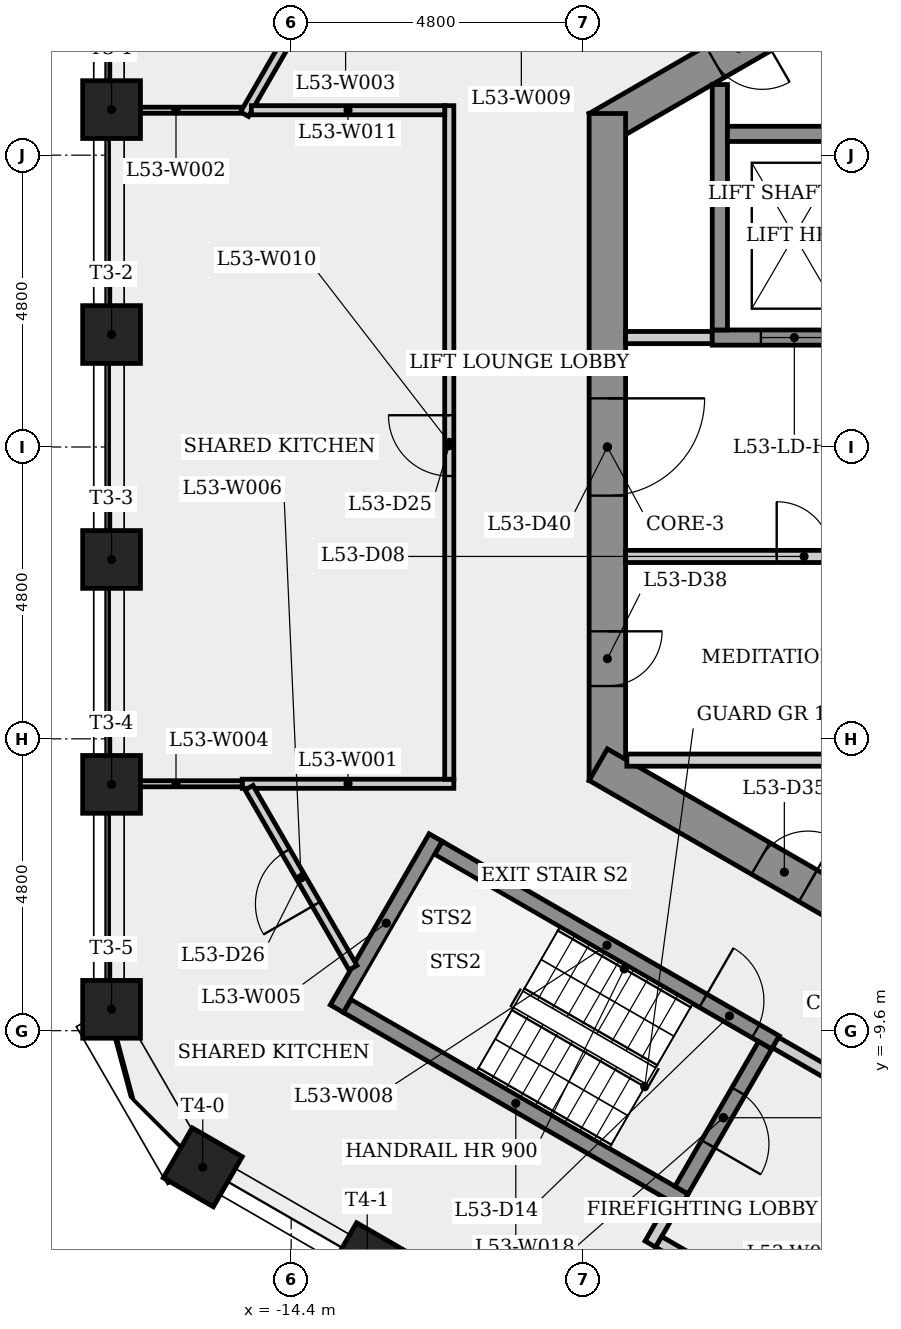
"""IFC4 building model, lengths in metres.
Left out: names, types, materials, properties, quantities, classifications, styles, units other than length and angle.
Written with IfcOpenShell. Run it as: python <this file> out.ifc"""

import sys

from ifc_helpers import new_model, si_unit, direction, frame, frame_2d, origin, origin_2d, place, context, subcontext, project, spatial, rectangle, extrude, element, fill, save


model = new_model("IFC4")
c1 = context("Model", 3, precision=1e-05, world=origin(), true_north=direction((0.0, 1.0)))
c2 = subcontext(c1, "Body", "Model", "MODEL_VIEW")
j1 = project(units=[si_unit("LENGTHUNIT", "METRE"), si_unit("PLANEANGLEUNIT", "RADIAN")], contexts=[c1])
p1 = place(None, origin())
s1 = spatial("IfcSite", under=j1, at=p1, CompositionType="ELEMENT")
p2 = place(p1, origin())
s2 = spatial("IfcBuilding", under=s1, at=p2, CompositionType="ELEMENT")
p3 = place(p2, frame((0.0, 0.0, 198.7)))
s3 = spatial("IfcBuildingStorey", under=s2, at=p3, CompositionType="ELEMENT", Elevation=198.7)
p4 = place(p3, frame((0.15, 10.71, 0.0), z_axis=(0.0, 0.0, 1.0), x_axis=(-0.866023993627, -0.500002442456, 0.0)))
e1 = element("IfcWall", 1, at=p4, inside=s3, PredefinedType="SHEAR", context=c2, shape_type="SweptSolid", body=[
    extrude(rectangle(XDim=10.97, YDim=0.6, at=frame_2d((5.485, 0.0))), origin(), (0.0, 0.0, 1.0), 3.4),
])
p5 = place(p4, frame((7.855, 0.0, 0.0)))
e2 = element("IfcOpeningElement", 2, at=p5, cuts=e1, PredefinedType="OPENING", context=c2, shape_type="SweptSolid", body=[
    extrude(rectangle(XDim=0.9, YDim=2.1, at=frame_2d((0.45, 1.05))), frame((0.0, 0.31, 0.0), z_axis=(0.0, -1.0, 0.0), x_axis=(1.0, 0.0, 0.0)), (0.0, 0.0, 1.0), 0.62),
])
p6 = place(p4, frame((1.398, 0.0, 0.0)))
e3 = element("IfcOpeningElement", 3, at=p6, cuts=e1, PredefinedType="OPENING", context=c2, shape_type="SweptSolid", body=[
    extrude(rectangle(XDim=0.9, YDim=2.1, at=frame_2d((0.45, 1.05))), frame((0.0, 0.31, 0.0), z_axis=(0.0, -1.0, 0.0), x_axis=(1.0, 0.0, 0.0)), (0.0, 0.0, 1.0), 0.62),
])
p7 = place(p3, frame((-9.2, 5.485, 0.0), z_axis=(0.0, 0.0, 1.0), x_axis=(0.0, -1.0, 0.0)))
e4 = element("IfcWall", 4, at=p7, inside=s3, PredefinedType="SHEAR", context=c2, shape_type="SweptSolid", body=[
    extrude(rectangle(XDim=10.97, YDim=0.6, at=frame_2d((5.485, 0.0))), origin(), (0.0, 0.0, 1.0), 3.4),
])
p8 = place(p7, frame((8.516, 0.0, 0.0)))
e5 = element("IfcOpeningElement", 5, at=p8, cuts=e4, PredefinedType="OPENING", context=c2, shape_type="SweptSolid", body=[
    extrude(rectangle(XDim=0.9, YDim=2.1, at=frame_2d((0.45, 1.05))), frame((0.0, 0.31, 0.0), z_axis=(0.0, -1.0, 0.0), x_axis=(1.0, 0.0, 0.0)), (0.0, 0.0, 1.0), 0.62),
])
p9 = place(p7, frame((4.685, 0.0, 0.0)))
e6 = element("IfcOpeningElement", 6, at=p9, cuts=e4, PredefinedType="OPENING", context=c2, shape_type="SweptSolid", body=[
    extrude(rectangle(XDim=1.6, YDim=2.1, at=frame_2d((0.8, 1.05))), frame((0.0, 0.31, 0.0), z_axis=(0.0, -1.0, 0.0), x_axis=(1.0, 0.0, 0.0)), (0.0, 0.0, 1.0), 0.62),
])
p10 = place(p3, frame((-9.35, -5.225, 0.0), z_axis=(0.0, 0.0, 1.0), x_axis=(0.866023993627, -0.500002442456, 0.0)))
e7 = element("IfcWall", 7, at=p10, inside=s3, PredefinedType="SHEAR", context=c2, shape_type="SweptSolid", body=[
    extrude(rectangle(XDim=10.97, YDim=0.6, at=frame_2d((5.485, 0.0))), origin(), (0.0, 0.0, 1.0), 3.4),
])
p11 = place(p10, frame((3.084, 0.0, 0.0)))
e8 = element("IfcOpeningElement", 8, at=p11, cuts=e7, PredefinedType="OPENING", context=c2, shape_type="SweptSolid", body=[
    extrude(rectangle(XDim=0.9, YDim=2.1, at=frame_2d((0.45, 1.05))), frame((0.0, 0.31, 0.0), z_axis=(0.0, -1.0, 0.0), x_axis=(1.0, 0.0, 0.0)), (0.0, 0.0, 1.0), 0.62),
])
p12 = place(p10, frame((8.21, 0.0, 0.0)))
e9 = element("IfcOpeningElement", 9, at=p12, cuts=e7, PredefinedType="OPENING", context=c2, shape_type="SweptSolid", body=[
    extrude(rectangle(XDim=0.9, YDim=2.1, at=frame_2d((0.45, 1.05))), frame((0.0, 0.31, 0.0), z_axis=(0.0, -1.0, 0.0), x_axis=(1.0, 0.0, 0.0)), (0.0, 0.0, 1.0), 0.62),
])
for number, where, z_axis, x_axis in (
    (10, (-17.354, 5.549, 0.0), (0.0, 0.0, 1.0), (-1.0, 0.0, 0.0)),
    (11, (-17.354, 1.85, 0.0), (0.0, 0.0, 1.0), (-1.0, 0.0, 0.0)),
    (12, (-17.354, -1.85, 0.0), (0.0, 0.0, 1.0), (-1.0, 0.0, 0.0)),
    (13, (-17.354, -5.549, 0.0), (0.0, 0.0, 1.0), (-1.0, 0.0, 0.0)),
    (14, (-17.354, -9.249, 0.0), (0.0, 0.0, 1.0), (-1.0, 0.0, 0.0)),
    (15, (-15.854, -11.847, 0.0), (0.0, 0.0, 1.0), (-0.5, -0.866, 0.0)),
    (16, (-13.15, -13.408, 0.0), (0.0, 0.0, 1.0), (-0.5, -0.866, 0.0)),
):
    element("IfcColumn", number, at=place(p3, frame(where, z_axis=z_axis, x_axis=x_axis)), inside=s3, PredefinedType="COLUMN", context=c2, shape_type="SweptSolid", body=[
        extrude(rectangle(XDim=0.95, YDim=0.95, at=origin_2d()), origin(), (0.0, 0.0, 1.0), 3.4),
    ])
p13 = place(p3, frame((-15.205, -5.539, 0.0), z_axis=(0.0, 0.0, 1.0), x_axis=(1.0, 0.0, 0.0)))
e17 = element("IfcWall", 17, at=p13, inside=s3, PredefinedType="PARTITIONING", context=c2, shape_type="SweptSolid", body=[
    extrude(rectangle(XDim=3.48, YDim=0.15, at=frame_2d((1.74, 0.0))), origin(), (0.0, 0.0, 1.0), 3.0),
])
p14 = place(p3, frame((-15.205, 5.539, 0.0), z_axis=(0.0, 0.0, 1.0), x_axis=(-1.0, 0.0, 0.0)))
e18 = element("IfcWall", 18, at=p14, inside=s3, PredefinedType="PARTITIONING", context=c2, shape_type="SweptSolid", body=[
    extrude(rectangle(XDim=2.179, YDim=0.1, at=frame_2d((1.089, 0.0))), origin(), (0.0, 0.0, 1.0), 3.0),
])
p15 = place(p3, frame((-15.167, 5.474, 0.0), z_axis=(0.0, 0.0, 1.0), x_axis=(0.500012717347, 0.866018061296, 0.0)))
e19 = element("IfcWall", 19, at=p15, inside=s3, PredefinedType="PARTITIONING", context=c2, shape_type="SweptSolid", body=[
    extrude(rectangle(XDim=6.65, YDim=0.15, at=frame_2d((3.325, 0.0))), origin(), (0.0, 0.0, 1.0), 3.0),
])
p16 = place(p15, frame((2.825, 0.0, 0.0)))
e20 = element("IfcOpeningElement", 20, at=p16, cuts=e19, PredefinedType="OPENING", context=c2, shape_type="SweptSolid", body=[
    extrude(rectangle(XDim=1.0, YDim=2.1, at=frame_2d((0.5, 1.05))), frame((0.0, 0.085, 0.0), z_axis=(0.0, -1.0, 0.0), x_axis=(1.0, 0.0, 0.0)), (0.0, 0.0, 1.0), 0.17),
])
p17 = place(p3, frame((-15.205, -5.539, 0.0), z_axis=(0.0, 0.0, 1.0), x_axis=(-1.0, 0.0, 0.0)))
e21 = element("IfcWall", 21, at=p17, inside=s3, PredefinedType="PARTITIONING", context=c2, shape_type="SweptSolid", body=[
    extrude(rectangle(XDim=2.179, YDim=0.1, at=frame_2d((1.089, 0.0))), origin(), (0.0, 0.0, 1.0), 3.0),
])
p18 = place(p3, frame((-13.648, -9.239, 0.0), z_axis=(0.0, 0.0, 1.0), x_axis=(0.500017246033, 0.866015446554, 0.0)))
e22 = element("IfcWall", 22, at=p18, inside=s3, PredefinedType="SHEAR", context=c2, shape_type="SweptSolid", body=[
    extrude(rectangle(XDim=3.25, YDim=0.25, at=frame_2d((1.625, 0.0))), origin(), (0.0, 0.0, 1.0), 3.0),
])
p19 = place(p3, frame((-13.383, -8.564, 0.0), z_axis=(0.0, 0.0, 1.0), x_axis=(-0.499980071345, 0.866036909293, 0.0)))
e23 = element("IfcWall", 23, at=p19, inside=s3, PredefinedType="PARTITIONING", context=c2, shape_type="SweptSolid", body=[
    extrude(rectangle(XDim=3.418, YDim=0.15, at=frame_2d((1.709, 0.0))), origin(), (0.0, 0.0, 1.0), 3.0),
])
p20 = place(p19, frame((1.209, 0.0, 0.0)))
e24 = element("IfcOpeningElement", 24, at=p20, cuts=e23, PredefinedType="OPENING", context=c2, shape_type="SweptSolid", body=[
    extrude(rectangle(XDim=1.0, YDim=2.1, at=frame_2d((0.5, 1.05))), frame((0.0, 0.085, 0.0), z_axis=(0.0, -1.0, 0.0), x_axis=(1.0, 0.0, 0.0)), (0.0, 0.0, 1.0), 0.17),
])
p21 = place(p3, frame((-11.977, -6.595, 0.0), z_axis=(0.0, 0.0, 1.0), x_axis=(0.866025499775, -0.499999833739, 0.0)))
e25 = element("IfcWall", 25, at=p21, inside=s3, PredefinedType="SHEAR", context=c2, shape_type="SweptSolid", body=[
    extrude(rectangle(XDim=6.4, YDim=0.25, at=frame_2d((3.2, 0.0))), origin(), (0.0, 0.0, 1.0), 3.0),
])
p22 = place(p21, frame((5.025, 0.0, 0.0)))
e26 = element("IfcOpeningElement", 26, at=p22, cuts=e25, PredefinedType="OPENING", context=c2, shape_type="SweptSolid", body=[
    extrude(rectangle(XDim=1.0, YDim=2.1, at=frame_2d((0.5, 1.05))), frame((0.0, 0.135, 0.0), z_axis=(0.0, -1.0, 0.0), x_axis=(1.0, 0.0, 0.0)), (0.0, 0.0, 1.0), 0.27),
])
p23 = place(p3, frame((-11.8, -5.464, 0.0), z_axis=(0.0, 0.0, 1.0), x_axis=(0.0, 1.0, 0.0)))
e27 = element("IfcWall", 27, at=p23, inside=s3, PredefinedType="PARTITIONING", context=c2, shape_type="SweptSolid", body=[
    extrude(rectangle(XDim=11.078, YDim=0.15, at=frame_2d((5.539, 0.0))), origin(), (0.0, 0.0, 1.0), 3.0),
])
p24 = place(p23, frame((4.986, 0.0, 0.0)))
e28 = element("IfcOpeningElement", 28, at=p24, cuts=e27, PredefinedType="OPENING", context=c2, shape_type="SweptSolid", body=[
    extrude(rectangle(XDim=1.0, YDim=2.1, at=frame_2d((0.5, 1.05))), frame((0.0, 0.085, 0.0), z_axis=(0.0, -1.0, 0.0), x_axis=(1.0, 0.0, 0.0)), (0.0, 0.0, 1.0), 0.17),
])
p25 = place(p3, frame((-11.875, 5.539, 0.0), z_axis=(0.0, 0.0, 1.0), x_axis=(-1.0, 0.0, 0.0)))
e29 = element("IfcWall", 29, at=p25, inside=s3, PredefinedType="PARTITIONING", context=c2, shape_type="SweptSolid", body=[
    extrude(rectangle(XDim=3.18, YDim=0.15, at=frame_2d((1.59, 0.0))), origin(), (0.0, 0.0, 1.0), 3.0),
])
p26 = place(p3, frame((-8.9, 1.8, 0.0), z_axis=(0.0, 0.0, 1.0), x_axis=(1.0, 0.0, 0.0)))
e30 = element("IfcWall", 30, at=p26, inside=s3, PredefinedType="PARTITIONING", context=c2, shape_type="SweptSolid", body=[
    extrude(rectangle(XDim=1.425, YDim=0.2, at=frame_2d((0.712, 0.0))), origin(), (0.0, 0.0, 1.0), 3.0),
])
p27 = place(p3, frame((-8.88, -5.15, 0.0), z_axis=(0.0, 0.0, 1.0), x_axis=(1.0, 0.0, 0.0)))
e31 = element("IfcWall", 31, at=p27, inside=s3, PredefinedType="PARTITIONING", context=c2, shape_type="SweptSolid", body=[
    extrude(rectangle(XDim=11.205, YDim=0.2, at=frame_2d((5.603, 0.0))), origin(), (0.0, 0.0, 1.0), 3.0),
])
p28 = place(p3, frame((-8.493, -13.11, 0.0), z_axis=(0.0, 0.0, 1.0), x_axis=(0.500067724834, 0.865986299303, 0.0)))
e32 = element("IfcWall", 32, at=p28, inside=s3, PredefinedType="PARTITIONING", context=c2, shape_type="SweptSolid", body=[
    extrude(rectangle(XDim=0.775, YDim=0.2, at=frame_2d((0.388, 0.0))), origin(), (0.0, 0.0, 1.0), 3.0),
])
p29 = place(p3, frame((-7.935, -12.393, 0.0), z_axis=(0.0, 0.0, 1.0), x_axis=(-0.866025499775, 0.499999833739, 0.0)))
e33 = element("IfcWall", 33, at=p29, inside=s3, PredefinedType="SHEAR", context=c2, shape_type="SweptSolid", body=[
    extrude(rectangle(XDim=6.4, YDim=0.25, at=frame_2d((3.2, 0.0))), origin(), (0.0, 0.0, 1.0), 3.0),
])
p30 = place(p3, frame((-7.836, -13.373, 0.0), z_axis=(0.0, 0.0, 1.0), x_axis=(-0.866232998003, 0.499640263761, 0.0)))
e34 = element("IfcWall", 34, at=p30, inside=s3, PredefinedType="PARTITIONING", context=c2, shape_type="SweptSolid", body=[
    extrude(rectangle(XDim=0.6, YDim=0.2, at=frame_2d((0.3, 0.0))), origin(), (0.0, 0.0, 1.0), 3.0),
])
p31 = place(p3, frame((-7.475, 1.8, 0.0), z_axis=(0.0, 0.0, 1.0), x_axis=(1.0, 0.0, 0.0)))
e35 = element("IfcWall", 35, at=p31, inside=s3, PredefinedType="SHEAR", context=c2, shape_type="SweptSolid", body=[
    extrude(rectangle(XDim=14.95, YDim=0.25, at=frame_2d((7.475, 0.0))), origin(), (0.0, 0.0, 1.0), 3.0),
])
p32 = place(p31, frame((0.8, 0.0, 0.0)))
e36 = element("IfcOpeningElement", 36, at=p32, cuts=e35, PredefinedType="OPENING", context=c2, shape_type="SweptSolid", body=[
    extrude(rectangle(XDim=1.1, YDim=2.1, at=frame_2d((0.55, 1.05))), frame((0.0, 0.135, 0.0), z_axis=(0.0, -1.0, 0.0), x_axis=(1.0, 0.0, 0.0)), (0.0, 0.0, 1.0), 0.27),
])
p33 = place(p31, frame((3.25, 0.0, 0.0)))
e37 = element("IfcOpeningElement", 37, at=p33, cuts=e35, PredefinedType="OPENING", context=c2, shape_type="SweptSolid", body=[
    extrude(rectangle(XDim=1.1, YDim=2.1, at=frame_2d((0.55, 1.05))), frame((0.0, 0.135, 0.0), z_axis=(0.0, -1.0, 0.0), x_axis=(1.0, 0.0, 0.0)), (0.0, 0.0, 1.0), 0.27),
])
p34 = place(p31, frame((5.7, 0.0, 0.0)))
e38 = element("IfcOpeningElement", 38, at=p34, cuts=e35, PredefinedType="OPENING", context=c2, shape_type="SweptSolid", body=[
    extrude(rectangle(XDim=1.1, YDim=2.1, at=frame_2d((0.55, 1.05))), frame((0.0, 0.135, 0.0), z_axis=(0.0, -1.0, 0.0), x_axis=(1.0, 0.0, 0.0)), (0.0, 0.0, 1.0), 0.27),
])
p35 = place(p31, frame((8.15, 0.0, 0.0)))
e39 = element("IfcOpeningElement", 39, at=p35, cuts=e35, PredefinedType="OPENING", context=c2, shape_type="SweptSolid", body=[
    extrude(rectangle(XDim=1.1, YDim=2.1, at=frame_2d((0.55, 1.05))), frame((0.0, 0.135, 0.0), z_axis=(0.0, -1.0, 0.0), x_axis=(1.0, 0.0, 0.0)), (0.0, 0.0, 1.0), 0.27),
])
p36 = place(p31, frame((10.6, 0.0, 0.0)))
e40 = element("IfcOpeningElement", 40, at=p36, cuts=e35, PredefinedType="OPENING", context=c2, shape_type="SweptSolid", body=[
    extrude(rectangle(XDim=1.1, YDim=2.1, at=frame_2d((0.55, 1.05))), frame((0.0, 0.135, 0.0), z_axis=(0.0, -1.0, 0.0), x_axis=(1.0, 0.0, 0.0)), (0.0, 0.0, 1.0), 0.27),
])
p37 = place(p31, frame((13.05, 0.0, 0.0)))
e41 = element("IfcOpeningElement", 41, at=p37, cuts=e35, PredefinedType="OPENING", context=c2, shape_type="SweptSolid", body=[
    extrude(rectangle(XDim=1.1, YDim=2.1, at=frame_2d((0.55, 1.05))), frame((0.0, 0.135, 0.0), z_axis=(0.0, -1.0, 0.0), x_axis=(1.0, 0.0, 0.0)), (0.0, 0.0, 1.0), 0.27),
])
p38 = place(p3, frame((-7.35, 1.925, 0.0), z_axis=(0.0, 0.0, 1.0), x_axis=(0.0, 1.0, 0.0)))
e42 = element("IfcWall", 42, at=p38, inside=s3, PredefinedType="SHEAR", context=c2, shape_type="SweptSolid", body=[
    extrude(rectangle(XDim=4.036, YDim=0.25, at=frame_2d((2.018, 0.0))), origin(), (0.0, 0.0, 1.0), 3.0),
])
p39 = place(p3, frame((-7.225, 5.15, 0.0), z_axis=(0.0, 0.0, 1.0), x_axis=(1.0, 0.0, 0.0)))
e43 = element("IfcWall", 43, at=p39, inside=s3, PredefinedType="SHEAR", context=c2, shape_type="SweptSolid", body=[
    extrude(rectangle(XDim=14.7, YDim=0.25, at=frame_2d((7.35, 0.0))), origin(), (0.0, 0.0, 1.0), 3.0),
])
p40 = place(p3, frame((-6.605, -9.841, 0.0), z_axis=(0.0, 0.0, 1.0), x_axis=(-0.499996545922, -0.866027397988, 0.0)))
e44 = element("IfcWall", 44, at=p40, inside=s3, PredefinedType="SHEAR", context=c2, shape_type="SweptSolid", body=[
    extrude(rectangle(XDim=2.75, YDim=0.25, at=frame_2d((1.375, 0.0))), origin(), (0.0, 0.0, 1.0), 3.0),
])
p41 = place(p40, frame((0.875, 0.0, 0.0)))
e45 = element("IfcOpeningElement", 45, at=p41, cuts=e44, PredefinedType="OPENING", context=c2, shape_type="SweptSolid", body=[
    extrude(rectangle(XDim=1.0, YDim=2.1, at=frame_2d((0.5, 1.05))), frame((0.0, 0.135, 0.0), z_axis=(0.0, -1.0, 0.0), x_axis=(1.0, 0.0, 0.0)), (0.0, 0.0, 1.0), 0.27),
])
p42 = place(p3, frame((-6.435, -9.795, 0.0), z_axis=(0.0, 0.0, 1.0), x_axis=(0.866012907634, -0.500021643343, 0.0)))
e46 = element("IfcWall", 46, at=p42, inside=s3, PredefinedType="PARTITIONING", context=c2, shape_type="SweptSolid", body=[
    extrude(rectangle(XDim=4.45, YDim=0.2, at=frame_2d((2.225, 0.0))), origin(), (0.0, 0.0, 1.0), 3.0),
])
p43 = place(p42, frame((1.675, 0.0, 0.0)))
e47 = element("IfcOpeningElement", 47, at=p43, cuts=e46, PredefinedType="OPENING", context=c2, shape_type="SweptSolid", body=[
    extrude(rectangle(XDim=1.1, YDim=2.1, at=frame_2d((0.55, 1.05))), frame((0.0, 0.11, 0.0), z_axis=(0.0, -1.0, 0.0), x_axis=(1.0, 0.0, 0.0)), (0.0, 0.0, 1.0), 0.22),
])
p44 = place(p3, frame((-8.9, -1.8, 0.0), z_axis=(0.0, 0.0, 1.0), x_axis=(1.0, 0.0, 0.0)))
e48 = element("IfcWall", 48, at=p44, inside=s3, PredefinedType="PARTITIONING", context=c2, shape_type="SweptSolid", body=[
    extrude(rectangle(XDim=11.225, YDim=0.2, at=frame_2d((5.613, 0.0))), origin(), (0.0, 0.0, 1.0), 3.0),
])
p45 = place(p44, frame((2.485, 0.0, 0.0)))
e49 = element("IfcOpeningElement", 49, at=p45, cuts=e48, PredefinedType="OPENING", context=c2, shape_type="SweptSolid", body=[
    extrude(rectangle(XDim=0.9, YDim=2.1, at=frame_2d((0.45, 1.05))), frame((0.0, 0.11, 0.0), z_axis=(0.0, -1.0, 0.0), x_axis=(1.0, 0.0, 0.0)), (0.0, 0.0, 1.0), 0.22),
])
p46 = place(p44, frame((8.387, 0.0, 0.0)))
e50 = element("IfcOpeningElement", 50, at=p46, cuts=e48, PredefinedType="OPENING", context=c2, shape_type="SweptSolid", body=[
    extrude(rectangle(XDim=0.9, YDim=2.1, at=frame_2d((0.45, 1.05))), frame((0.0, 0.11, 0.0), z_axis=(0.0, -1.0, 0.0), x_axis=(1.0, 0.0, 0.0)), (0.0, 0.0, 1.0), 0.22),
])
p47 = place(p32, origin())
e51 = element("IfcDoor", 51, at=p47, inside=s3, OperationType="SLIDING_TO_LEFT", PredefinedType="DOOR", context=c2, shape_type="SweptSolid", body=[
    extrude(rectangle(XDim=1.1, YDim=2.1, at=frame_2d((0.55, 1.05))), frame((0.0, 0.025, 0.0), z_axis=(0.0, -1.0, 0.0), x_axis=(1.0, 0.0, 0.0)), (0.0, 0.0, 1.0), 0.05),
])
fill(e36, e51)
p48 = place(p45, origin())
e52 = element("IfcDoor", 52, at=p48, inside=s3, OperationType="SINGLE_SWING_LEFT", PredefinedType="DOOR", context=c2, shape_type="SweptSolid", body=[
    extrude(rectangle(XDim=0.9, YDim=2.1, at=frame_2d((0.45, 1.05))), frame((0.0, 0.025, 0.0), z_axis=(0.0, -1.0, 0.0), x_axis=(1.0, 0.0, 0.0)), (0.0, 0.0, 1.0), 0.05),
])
fill(e49, e52)
p49 = place(p22, origin())
e53 = element("IfcDoor", 53, at=p49, inside=s3, OperationType="SINGLE_SWING_LEFT", PredefinedType="DOOR", context=c2, shape_type="SweptSolid", body=[
    extrude(rectangle(XDim=1.0, YDim=2.1, at=frame_2d((0.5, 1.05))), frame((0.0, 0.025, 0.0), z_axis=(0.0, -1.0, 0.0), x_axis=(1.0, 0.0, 0.0)), (0.0, 0.0, 1.0), 0.05),
])
fill(e26, e53)
p50 = place(p41, origin())
e54 = element("IfcDoor", 54, at=p50, inside=s3, OperationType="SINGLE_SWING_RIGHT", PredefinedType="DOOR", context=c2, shape_type="SweptSolid", body=[
    extrude(rectangle(XDim=1.0, YDim=2.1, at=frame_2d((0.5, 1.05))), frame((0.0, 0.025, 0.0), z_axis=(0.0, -1.0, 0.0), x_axis=(1.0, 0.0, 0.0)), (0.0, 0.0, 1.0), 0.05),
])
fill(e45, e54)
p51 = place(p24, origin())
e55 = element("IfcDoor", 55, at=p51, inside=s3, OperationType="SINGLE_SWING_RIGHT", PredefinedType="DOOR", context=c2, shape_type="SweptSolid", body=[
    extrude(rectangle(XDim=1.0, YDim=2.1, at=frame_2d((0.5, 1.05))), frame((0.0, 0.025, 0.0), z_axis=(0.0, -1.0, 0.0), x_axis=(1.0, 0.0, 0.0)), (0.0, 0.0, 1.0), 0.05),
])
fill(e28, e55)
p52 = place(p20, origin())
e56 = element("IfcDoor", 56, at=p52, inside=s3, OperationType="SINGLE_SWING_LEFT", PredefinedType="DOOR", context=c2, shape_type="SweptSolid", body=[
    extrude(rectangle(XDim=1.0, YDim=2.1, at=frame_2d((0.5, 1.05))), frame((0.0, 0.025, 0.0), z_axis=(0.0, -1.0, 0.0), x_axis=(1.0, 0.0, 0.0)), (0.0, 0.0, 1.0), 0.05),
])
fill(e24, e56)
p53 = place(p5, origin())
e57 = element("IfcDoor", 57, at=p53, inside=s3, OperationType="SINGLE_SWING_LEFT", PredefinedType="DOOR", context=c2, shape_type="SweptSolid", body=[
    extrude(rectangle(XDim=0.9, YDim=2.1, at=frame_2d((0.45, 1.05))), frame((0.0, 0.025, 0.0), z_axis=(0.0, -1.0, 0.0), x_axis=(1.0, 0.0, 0.0)), (0.0, 0.0, 1.0), 0.05),
])
fill(e2, e57)
p54 = place(p11, origin())
e58 = element("IfcDoor", 58, at=p54, inside=s3, OperationType="SINGLE_SWING_RIGHT", PredefinedType="DOOR", context=c2, shape_type="SweptSolid", body=[
    extrude(rectangle(XDim=0.9, YDim=2.1, at=frame_2d((0.45, 1.05))), frame((0.0, 0.025, 0.0), z_axis=(0.0, -1.0, 0.0), x_axis=(1.0, 0.0, 0.0)), (0.0, 0.0, 1.0), 0.05),
])
fill(e8, e58)
p55 = place(p8, origin())
e59 = element("IfcDoor", 59, at=p55, inside=s3, OperationType="SINGLE_SWING_LEFT", PredefinedType="DOOR", context=c2, shape_type="SweptSolid", body=[
    extrude(rectangle(XDim=0.9, YDim=2.1, at=frame_2d((0.45, 1.05))), frame((0.0, 0.025, 0.0), z_axis=(0.0, -1.0, 0.0), x_axis=(1.0, 0.0, 0.0)), (0.0, 0.0, 1.0), 0.05),
])
fill(e5, e59)
p56 = place(p9, origin())
e60 = element("IfcDoor", 60, at=p56, inside=s3, OperationType="SINGLE_SWING_LEFT", PredefinedType="DOOR", context=c2, shape_type="SweptSolid", body=[
    extrude(rectangle(XDim=1.6, YDim=2.1, at=frame_2d((0.8, 1.05))), frame((0.0, 0.025, 0.0), z_axis=(0.0, -1.0, 0.0), x_axis=(1.0, 0.0, 0.0)), (0.0, 0.0, 1.0), 0.05),
])
fill(e6, e60)
save(model, sys.argv[1])
